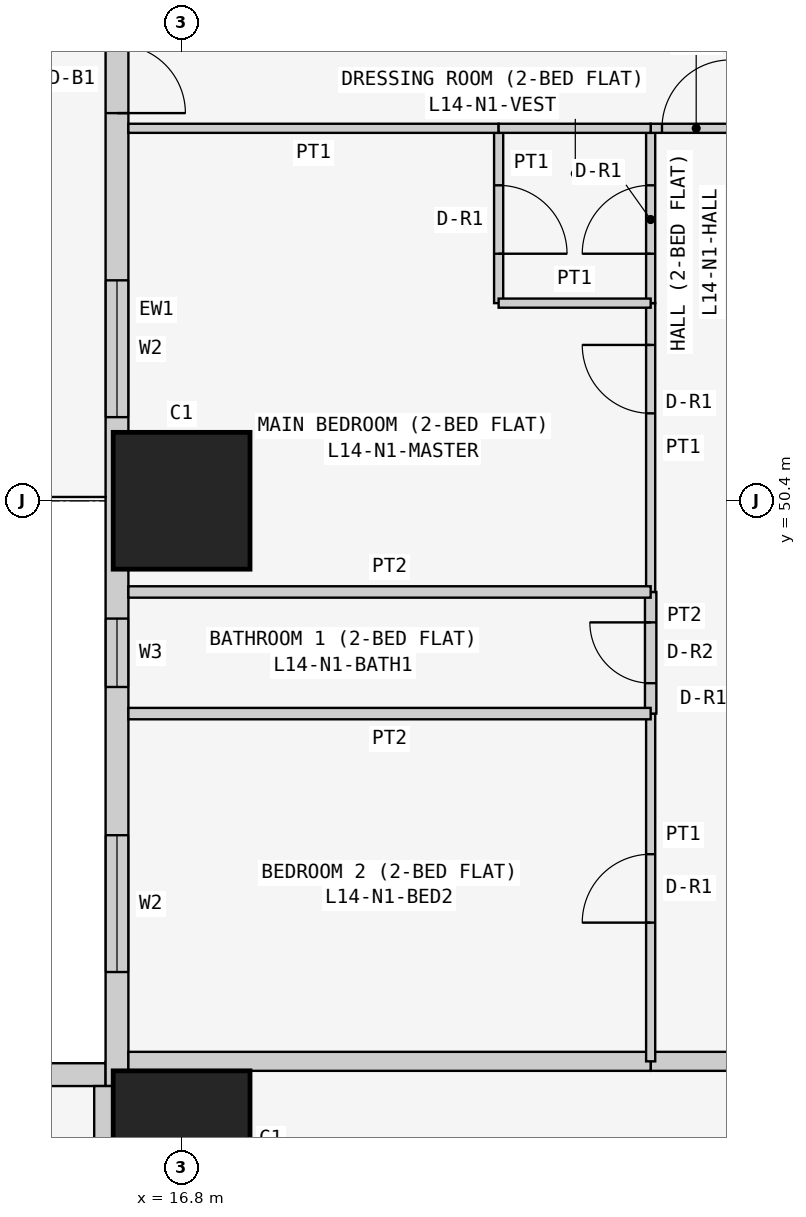
"""IFC4 building model, lengths in metres.
Left out: names, types, materials, properties, quantities, classifications, styles, units other than length and angle.
Written with IfcOpenShell. Run it as: python <this file> out.ifc"""

import sys

from ifc_helpers import new_model, si_unit, direction, frame, frame_2d, origin, origin_2d, place, context, subcontext, project, spatial, rectangle, extrude, element, fill, save


model = new_model("IFC4")
c1 = context("Model", 3, precision=1e-05, world=origin(), true_north=direction((0.0, 1.0)))
c2 = subcontext(c1, "Body", "Model", "MODEL_VIEW")
j1 = project(units=[si_unit("LENGTHUNIT", "METRE"), si_unit("PLANEANGLEUNIT", "RADIAN")], contexts=[c1])
p1 = place(None, origin())
s1 = spatial("IfcSite", under=j1, at=p1, CompositionType="ELEMENT")
p2 = place(p1, origin())
s2 = spatial("IfcBuilding", under=s1, at=p2, CompositionType="ELEMENT")
p3 = place(p2, frame((0.0, 0.0, 59.7)))
s3 = spatial("IfcBuildingStorey", under=s2, at=p3, CompositionType="ELEMENT", Elevation=59.7)
for number, where, z_axis, x_axis in (
    (1, (16.8, 42.0, 0.0), (0.0, 0.0, 1.0), (1.0, 0.0, 0.0)),
    (2, (16.8, 50.4, 0.0), (0.0, 0.0, 1.0), (1.0, 0.0, 0.0)),
):
    element("IfcColumn", number, at=place(p3, frame(where, z_axis=z_axis, x_axis=x_axis)), inside=s3, PredefinedType="COLUMN", context=c2, shape_type="SweptSolid", body=[
        extrude(rectangle(XDim=1.8, YDim=1.8, at=origin_2d()), origin(), (0.0, 0.0, 1.0), 3.6),
    ])
p4 = place(p3, frame((15.8, 42.85, 0.0), z_axis=(0.0, 0.0, 1.0), x_axis=(-1.0, 0.0, 0.0)))
e3 = element("IfcWall", 3, at=p4, inside=s3, PredefinedType="SOLIDWALL", context=c2, shape_type="SweptSolid", body=[
    extrude(rectangle(XDim=15.4, YDim=0.3, at=frame_2d((7.7, 0.0))), origin(), (0.0, 0.0, 1.0), 3.45),
])
p5 = place(p4, frame((1.2, 0.0, 0.9)))
e4 = element("IfcOpeningElement", 4, at=p5, cuts=e3, PredefinedType="OPENING", context=c2, shape_type="SweptSolid", body=[
    extrude(rectangle(XDim=1.8, YDim=1.5, at=frame_2d((0.9, 0.75))), frame((0.0, 0.16, 0.0), z_axis=(0.0, -1.0, 0.0), x_axis=(1.0, 0.0, 0.0)), (0.0, 0.0, 1.0), 0.32),
])
p6 = place(p4, frame((4.95, 0.0, 1.5)))
e5 = element("IfcOpeningElement", 5, at=p6, cuts=e3, PredefinedType="OPENING", context=c2, shape_type="SweptSolid", body=[
    extrude(rectangle(XDim=0.9, YDim=0.7, at=frame_2d((0.45, 0.35))), frame((0.0, 0.16, 0.0), z_axis=(0.0, -1.0, 0.0), x_axis=(1.0, 0.0, 0.0)), (0.0, 0.0, 1.0), 0.32),
])
p7 = place(p4, frame((8.5, 0.0, 0.9)))
e6 = element("IfcOpeningElement", 6, at=p7, cuts=e3, PredefinedType="OPENING", context=c2, shape_type="SweptSolid", body=[
    extrude(rectangle(XDim=1.8, YDim=1.5, at=frame_2d((0.9, 0.75))), frame((0.0, 0.16, 0.0), z_axis=(0.0, -1.0, 0.0), x_axis=(1.0, 0.0, 0.0)), (0.0, 0.0, 1.0), 0.32),
])
p8 = place(p4, frame((12.5, 0.0, 0.0)))
e7 = element("IfcOpeningElement", 7, at=p8, cuts=e3, PredefinedType="OPENING", context=c2, shape_type="SweptSolid", body=[
    extrude(rectangle(XDim=0.9, YDim=2.4, at=frame_2d((0.45, 1.2))), frame((0.0, 0.16, 0.0), z_axis=(0.0, -1.0, 0.0), x_axis=(1.0, 0.0, 0.0)), (0.0, 0.0, 1.0), 0.32),
])
p9 = place(p4, frame((13.5, 0.0, 0.9)))
e8 = element("IfcOpeningElement", 8, at=p9, cuts=e3, PredefinedType="OPENING", context=c2, shape_type="SweptSolid", body=[
    extrude(rectangle(XDim=1.2, YDim=1.5, at=frame_2d((0.6, 0.75))), frame((0.0, 0.16, 0.0), z_axis=(0.0, -1.0, 0.0), x_axis=(1.0, 0.0, 0.0)), (0.0, 0.0, 1.0), 0.32),
])
p10 = place(p3, frame((15.95, 58.4, 0.0), z_axis=(0.0, 0.0, 1.0), x_axis=(0.0, -1.0, 0.0)))
e9 = element("IfcWall", 9, at=p10, inside=s3, PredefinedType="SOLIDWALL", context=c2, shape_type="SweptSolid", body=[
    extrude(rectangle(XDim=15.7, YDim=0.3, at=frame_2d((7.85, 0.0))), origin(), (0.0, 0.0, 1.0), 3.45),
])
p11 = place(p10, frame((12.4, 0.0, 0.9)))
e10 = element("IfcOpeningElement", 10, at=p11, cuts=e9, PredefinedType="OPENING", context=c2, shape_type="SweptSolid", body=[
    extrude(rectangle(XDim=1.8, YDim=1.5, at=frame_2d((0.9, 0.75))), frame((0.0, 0.16, 0.0), z_axis=(0.0, -1.0, 0.0), x_axis=(1.0, 0.0, 0.0)), (0.0, 0.0, 1.0), 0.32),
])
p12 = place(p10, frame((9.55, 0.0, 1.5)))
e11 = element("IfcOpeningElement", 11, at=p12, cuts=e9, PredefinedType="OPENING", context=c2, shape_type="SweptSolid", body=[
    extrude(rectangle(XDim=0.9, YDim=0.7, at=frame_2d((0.45, 0.35))), frame((0.0, 0.16, 0.0), z_axis=(0.0, -1.0, 0.0), x_axis=(1.0, 0.0, 0.0)), (0.0, 0.0, 1.0), 0.32),
])
p13 = place(p10, frame((5.1, 0.0, 0.9)))
e12 = element("IfcOpeningElement", 12, at=p13, cuts=e9, PredefinedType="OPENING", context=c2, shape_type="SweptSolid", body=[
    extrude(rectangle(XDim=1.8, YDim=1.5, at=frame_2d((0.9, 0.75))), frame((0.0, 0.16, 0.0), z_axis=(0.0, -1.0, 0.0), x_axis=(1.0, 0.0, 0.0)), (0.0, 0.0, 1.0), 0.32),
])
p14 = place(p10, frame((2.0, 0.0, 0.0)))
e13 = element("IfcOpeningElement", 13, at=p14, cuts=e9, PredefinedType="OPENING", context=c2, shape_type="SweptSolid", body=[
    extrude(rectangle(XDim=0.9, YDim=2.4, at=frame_2d((0.45, 1.2))), frame((0.0, 0.16, 0.0), z_axis=(0.0, -1.0, 0.0), x_axis=(1.0, 0.0, 0.0)), (0.0, 0.0, 1.0), 0.32),
])
p15 = place(p10, frame((0.7, 0.0, 0.9)))
e14 = element("IfcOpeningElement", 14, at=p15, cuts=e9, PredefinedType="OPENING", context=c2, shape_type="SweptSolid", body=[
    extrude(rectangle(XDim=1.2, YDim=1.5, at=frame_2d((0.6, 0.75))), frame((0.0, 0.16, 0.0), z_axis=(0.0, -1.0, 0.0), x_axis=(1.0, 0.0, 0.0)), (0.0, 0.0, 1.0), 0.32),
])
p16 = place(p3, frame((22.971, 43.025, 0.0), z_axis=(0.0, 0.0, 1.0), x_axis=(1.0, 0.0, 0.0)))
e15 = element("IfcWall", 15, at=p16, inside=s3, PredefinedType="PARTITIONING", context=c2, shape_type="SweptSolid", body=[
    extrude(rectangle(XDim=1.2, YDim=0.25, at=frame_2d((0.6, 0.0))), origin(), (0.0, 0.0, 1.0), 3.45),
])
for number, where, z_axis, x_axis in (
    (16, (16.1, 43.025, 0.0), (0.0, 0.0, 1.0), (1.0, 0.0, 0.0)),
    (17, (15.775, 35.829, 0.0), (0.0, 0.0, 1.0), (0.0, 1.0, 0.0)),
):
    element("IfcWall", number, at=place(p3, frame(where, z_axis=z_axis, x_axis=x_axis)), inside=s3, PredefinedType="PARTITIONING", context=c2, shape_type="SweptSolid", body=[
        extrude(rectangle(XDim=6.871, YDim=0.25, at=frame_2d((3.436, 0.0))), origin(), (0.0, 0.0, 1.0), 3.45),
    ])
p17 = place(p3, frame((22.971, 47.6, 0.0), z_axis=(0.0, 0.0, 1.0), x_axis=(0.0, -1.0, 0.0)))
e18 = element("IfcWall", 18, at=p17, inside=s3, PredefinedType="PARTITIONING", context=c2, shape_type="SweptSolid", body=[
    extrude(rectangle(XDim=4.575, YDim=0.12, at=frame_2d((2.288, 0.0))), origin(), (0.0, 0.0, 1.0), 3.45),
])
p18 = place(p17, frame((1.85, 0.0, 0.0)))
e19 = element("IfcOpeningElement", 19, at=p18, cuts=e18, PredefinedType="OPENING", context=c2, shape_type="SweptSolid", body=[
    extrude(rectangle(XDim=0.9, YDim=2.1, at=frame_2d((0.45, 1.05))), frame((0.0, 0.07, 0.0), z_axis=(0.0, -1.0, 0.0), x_axis=(1.0, 0.0, 0.0)), (0.0, 0.0, 1.0), 0.14),
])
p19 = place(p3, frame((22.971, 49.2, 0.0), z_axis=(0.0, 0.0, 1.0), x_axis=(0.0, -1.0, 0.0)))
e20 = element("IfcWall", 20, at=p19, inside=s3, PredefinedType="PARTITIONING", context=c2, shape_type="SweptSolid", body=[
    extrude(rectangle(XDim=1.6, YDim=0.15, at=frame_2d((0.8, 0.0))), origin(), (0.0, 0.0, 1.0), 3.45),
])
p20 = place(p19, frame((0.4, 0.0, 0.0)))
e21 = element("IfcOpeningElement", 21, at=p20, cuts=e20, PredefinedType="OPENING", context=c2, shape_type="SweptSolid", body=[
    extrude(rectangle(XDim=0.8, YDim=2.1, at=frame_2d((0.4, 1.05))), frame((0.0, 0.085, 0.0), z_axis=(0.0, -1.0, 0.0), x_axis=(1.0, 0.0, 0.0)), (0.0, 0.0, 1.0), 0.17),
])
p21 = place(p3, frame((22.971, 53.0, 0.0), z_axis=(0.0, 0.0, 1.0), x_axis=(0.0, -1.0, 0.0)))
e22 = element("IfcWall", 22, at=p21, inside=s3, PredefinedType="PARTITIONING", context=c2, shape_type="SweptSolid", body=[
    extrude(rectangle(XDim=3.8, YDim=0.12, at=frame_2d((1.9, 0.0))), origin(), (0.0, 0.0, 1.0), 3.45),
])
p22 = place(p21, frame((0.55, 0.0, 0.0)))
e23 = element("IfcOpeningElement", 23, at=p22, cuts=e22, PredefinedType="OPENING", context=c2, shape_type="SweptSolid", body=[
    extrude(rectangle(XDim=0.9, YDim=2.1, at=frame_2d((0.45, 1.05))), frame((0.0, 0.07, 0.0), z_axis=(0.0, -1.0, 0.0), x_axis=(1.0, 0.0, 0.0)), (0.0, 0.0, 1.0), 0.14),
])
p23 = place(p3, frame((22.971, 55.3, 0.0), z_axis=(0.0, 0.0, 1.0), x_axis=(0.0, -1.0, 0.0)))
e24 = element("IfcWall", 24, at=p23, inside=s3, PredefinedType="PARTITIONING", context=c2, shape_type="SweptSolid", body=[
    extrude(rectangle(XDim=2.3, YDim=0.12, at=frame_2d((1.15, 0.0))), origin(), (0.0, 0.0, 1.0), 3.45),
])
p24 = place(p23, frame((0.75, 0.0, 0.0)))
e25 = element("IfcOpeningElement", 25, at=p24, cuts=e24, PredefinedType="OPENING", context=c2, shape_type="SweptSolid", body=[
    extrude(rectangle(XDim=0.9, YDim=2.1, at=frame_2d((0.45, 1.05))), frame((0.0, 0.07, 0.0), z_axis=(0.0, -1.0, 0.0), x_axis=(1.0, 0.0, 0.0)), (0.0, 0.0, 1.0), 0.14),
])
p25 = place(p3, frame((24.171, 55.3, 0.0), z_axis=(0.0, 0.0, 1.0), x_axis=(-1.0, 0.0, 0.0)))
e26 = element("IfcWall", 26, at=p25, inside=s3, PredefinedType="PARTITIONING", context=c2, shape_type="SweptSolid", body=[
    extrude(rectangle(XDim=1.2, YDim=0.12, at=frame_2d((0.6, 0.0))), origin(), (0.0, 0.0, 1.0), 3.45),
])
p26 = place(p25, frame((0.151, 0.0, 0.0)))
e27 = element("IfcOpeningElement", 27, at=p26, cuts=e26, PredefinedType="OPENING", context=c2, shape_type="SweptSolid", body=[
    extrude(rectangle(XDim=0.9, YDim=2.1, at=frame_2d((0.45, 1.05))), frame((0.0, 0.07, 0.0), z_axis=(0.0, -1.0, 0.0), x_axis=(1.0, 0.0, 0.0)), (0.0, 0.0, 1.0), 0.14),
])
for number, where, z_axis, x_axis in (
    (28, (22.971, 47.6, 0.0), (0.0, 0.0, 1.0), (-1.0, 0.0, 0.0)),
    (29, (22.971, 49.2, 0.0), (0.0, 0.0, 1.0), (-1.0, 0.0, 0.0)),
):
    element("IfcWall", number, at=place(p3, frame(where, z_axis=z_axis, x_axis=x_axis)), inside=s3, PredefinedType="PARTITIONING", context=c2, shape_type="SweptSolid", body=[
        extrude(rectangle(XDim=6.871, YDim=0.15, at=frame_2d((3.436, 0.0))), origin(), (0.0, 0.0, 1.0), 3.45),
    ])
p27 = place(p3, frame((20.971, 55.3, 0.0), z_axis=(0.0, 0.0, 1.0), x_axis=(0.0, -1.0, 0.0)))
e30 = element("IfcWall", 30, at=p27, inside=s3, PredefinedType="PARTITIONING", context=c2, shape_type="SweptSolid", body=[
    extrude(rectangle(XDim=2.3, YDim=0.12, at=frame_2d((1.15, 0.0))), origin(), (0.0, 0.0, 1.0), 2.848),
])
p28 = place(p27, frame((0.75, 0.0, 0.0)))
e31 = element("IfcOpeningElement", 31, at=p28, cuts=e30, PredefinedType="OPENING", context=c2, shape_type="SweptSolid", body=[
    extrude(rectangle(XDim=0.9, YDim=2.1, at=frame_2d((0.45, 1.05))), frame((0.0, 0.07, 0.0), z_axis=(0.0, -1.0, 0.0), x_axis=(1.0, 0.0, 0.0)), (0.0, 0.0, 1.0), 0.14),
])
p29 = place(p3, frame((20.971, 53.0, 0.0), z_axis=(0.0, 0.0, 1.0), x_axis=(1.0, 0.0, 0.0)))
e32 = element("IfcWall", 32, at=p29, inside=s3, PredefinedType="PARTITIONING", context=c2, shape_type="SweptSolid", body=[
    extrude(rectangle(XDim=2.0, YDim=0.12, at=frame_2d((1.0, 0.0))), origin(), (0.0, 0.0, 1.0), 3.45),
])
p30 = place(p3, frame((16.1, 55.3, 0.0), z_axis=(0.0, 0.0, 1.0), x_axis=(1.0, 0.0, 0.0)))
e33 = element("IfcWall", 33, at=p30, inside=s3, PredefinedType="PARTITIONING", context=c2, shape_type="SweptSolid", body=[
    extrude(rectangle(XDim=4.871, YDim=0.12, at=frame_2d((2.436, 0.0))), origin(), (0.0, 0.0, 1.0), 3.45),
])
p31 = place(p3, frame((22.971, 55.3, 0.0), z_axis=(0.0, 0.0, 1.0), x_axis=(-1.0, 0.0, 0.0)))
e34 = element("IfcWall", 34, at=p31, inside=s3, PredefinedType="PARTITIONING", context=c2, shape_type="SweptSolid", body=[
    extrude(rectangle(XDim=2.0, YDim=0.12, at=frame_2d((1.0, 0.0))), origin(), (0.0, 0.0, 1.0), 3.45),
])
p32 = place(p11, origin())
e35 = element("IfcWindow", 35, at=p32, inside=s3, PartitioningType="SINGLE_PANEL", PredefinedType="WINDOW", context=c2, shape_type="SweptSolid", body=[
    extrude(rectangle(XDim=1.8, YDim=1.5, at=frame_2d((0.9, 0.75))), frame((0.0, 0.03, 0.0), z_axis=(0.0, -1.0, 0.0), x_axis=(1.0, 0.0, 0.0)), (0.0, 0.0, 1.0), 0.06),
])
fill(e10, e35)
p33 = place(p12, origin())
e36 = element("IfcWindow", 36, at=p33, inside=s3, PartitioningType="SINGLE_PANEL", PredefinedType="WINDOW", context=c2, shape_type="SweptSolid", body=[
    extrude(rectangle(XDim=0.9, YDim=0.7, at=frame_2d((0.45, 0.35))), frame((0.0, 0.03, 0.0), z_axis=(0.0, -1.0, 0.0), x_axis=(1.0, 0.0, 0.0)), (0.0, 0.0, 1.0), 0.06),
])
fill(e11, e36)
p34 = place(p13, origin())
e37 = element("IfcWindow", 37, at=p34, inside=s3, PartitioningType="SINGLE_PANEL", PredefinedType="WINDOW", context=c2, shape_type="SweptSolid", body=[
    extrude(rectangle(XDim=1.8, YDim=1.5, at=frame_2d((0.9, 0.75))), frame((0.0, 0.03, 0.0), z_axis=(0.0, -1.0, 0.0), x_axis=(1.0, 0.0, 0.0)), (0.0, 0.0, 1.0), 0.06),
])
fill(e12, e37)
p35 = place(p14, origin())
e38 = element("IfcDoor", 38, at=p35, inside=s3, OperationType="SINGLE_SWING_RIGHT", PredefinedType="DOOR", context=c2, shape_type="SweptSolid", body=[
    extrude(rectangle(XDim=0.9, YDim=2.4, at=frame_2d((0.45, 1.2))), frame((0.0, 0.025, 0.0), z_axis=(0.0, -1.0, 0.0), x_axis=(1.0, 0.0, 0.0)), (0.0, 0.0, 1.0), 0.05),
])
fill(e13, e38)
p36 = place(p18, frame((0.9, 0.0, 0.0), z_axis=(0.0, 0.0, 1.0), x_axis=(-1.0, 0.0, 0.0)))
e39 = element("IfcDoor", 39, at=p36, inside=s3, OperationType="SINGLE_SWING_LEFT", PredefinedType="DOOR", context=c2, shape_type="SweptSolid", body=[
    extrude(rectangle(XDim=0.9, YDim=2.1, at=frame_2d((0.45, 1.05))), frame((0.0, 0.025, 0.0), z_axis=(0.0, -1.0, 0.0), x_axis=(1.0, 0.0, 0.0)), (0.0, 0.0, 1.0), 0.05),
])
fill(e19, e39)
p37 = place(p20, frame((0.8, 0.0, 0.0), z_axis=(0.0, 0.0, 1.0), x_axis=(-1.0, 0.0, 0.0)))
e40 = element("IfcDoor", 40, at=p37, inside=s3, OperationType="SINGLE_SWING_RIGHT", PredefinedType="DOOR", context=c2, shape_type="SweptSolid", body=[
    extrude(rectangle(XDim=0.8, YDim=2.1, at=frame_2d((0.4, 1.05))), frame((0.0, 0.025, 0.0), z_axis=(0.0, -1.0, 0.0), x_axis=(1.0, 0.0, 0.0)), (0.0, 0.0, 1.0), 0.05),
])
fill(e21, e40)
p38 = place(p22, frame((0.9, 0.0, 0.0), z_axis=(0.0, 0.0, 1.0), x_axis=(-1.0, 0.0, 0.0)))
e41 = element("IfcDoor", 41, at=p38, inside=s3, OperationType="SINGLE_SWING_RIGHT", PredefinedType="DOOR", context=c2, shape_type="SweptSolid", body=[
    extrude(rectangle(XDim=0.9, YDim=2.1, at=frame_2d((0.45, 1.05))), frame((0.0, 0.025, 0.0), z_axis=(0.0, -1.0, 0.0), x_axis=(1.0, 0.0, 0.0)), (0.0, 0.0, 1.0), 0.05),
])
fill(e23, e41)
p39 = place(p24, frame((0.9, 0.0, 0.0), z_axis=(0.0, 0.0, 1.0), x_axis=(-1.0, 0.0, 0.0)))
e42 = element("IfcDoor", 42, at=p39, inside=s3, OperationType="SINGLE_SWING_LEFT", PredefinedType="DOOR", context=c2, shape_type="SweptSolid", body=[
    extrude(rectangle(XDim=0.9, YDim=2.1, at=frame_2d((0.45, 1.05))), frame((0.0, 0.025, 0.0), z_axis=(0.0, -1.0, 0.0), x_axis=(1.0, 0.0, 0.0)), (0.0, 0.0, 1.0), 0.05),
])
fill(e25, e42)
p40 = place(p28, origin())
e43 = element("IfcDoor", 43, at=p40, inside=s3, OperationType="SINGLE_SWING_RIGHT", PredefinedType="DOOR", context=c2, shape_type="SweptSolid", body=[
    extrude(rectangle(XDim=0.9, YDim=2.1, at=frame_2d((0.45, 1.05))), frame((0.0, 0.025, 0.0), z_axis=(0.0, -1.0, 0.0), x_axis=(1.0, 0.0, 0.0)), (0.0, 0.0, 1.0), 0.05),
])
fill(e31, e43)
p41 = place(p26, frame((0.9, 0.0, 0.0), z_axis=(0.0, 0.0, 1.0), x_axis=(-1.0, 0.0, 0.0)))
e44 = element("IfcDoor", 44, at=p41, inside=s3, OperationType="SINGLE_SWING_RIGHT", PredefinedType="DOOR", context=c2, shape_type="SweptSolid", body=[
    extrude(rectangle(XDim=0.9, YDim=2.1, at=frame_2d((0.45, 1.05))), frame((0.0, 0.025, 0.0), z_axis=(0.0, -1.0, 0.0), x_axis=(1.0, 0.0, 0.0)), (0.0, 0.0, 1.0), 0.05),
])
fill(e27, e44)
save(model, sys.argv[1])
